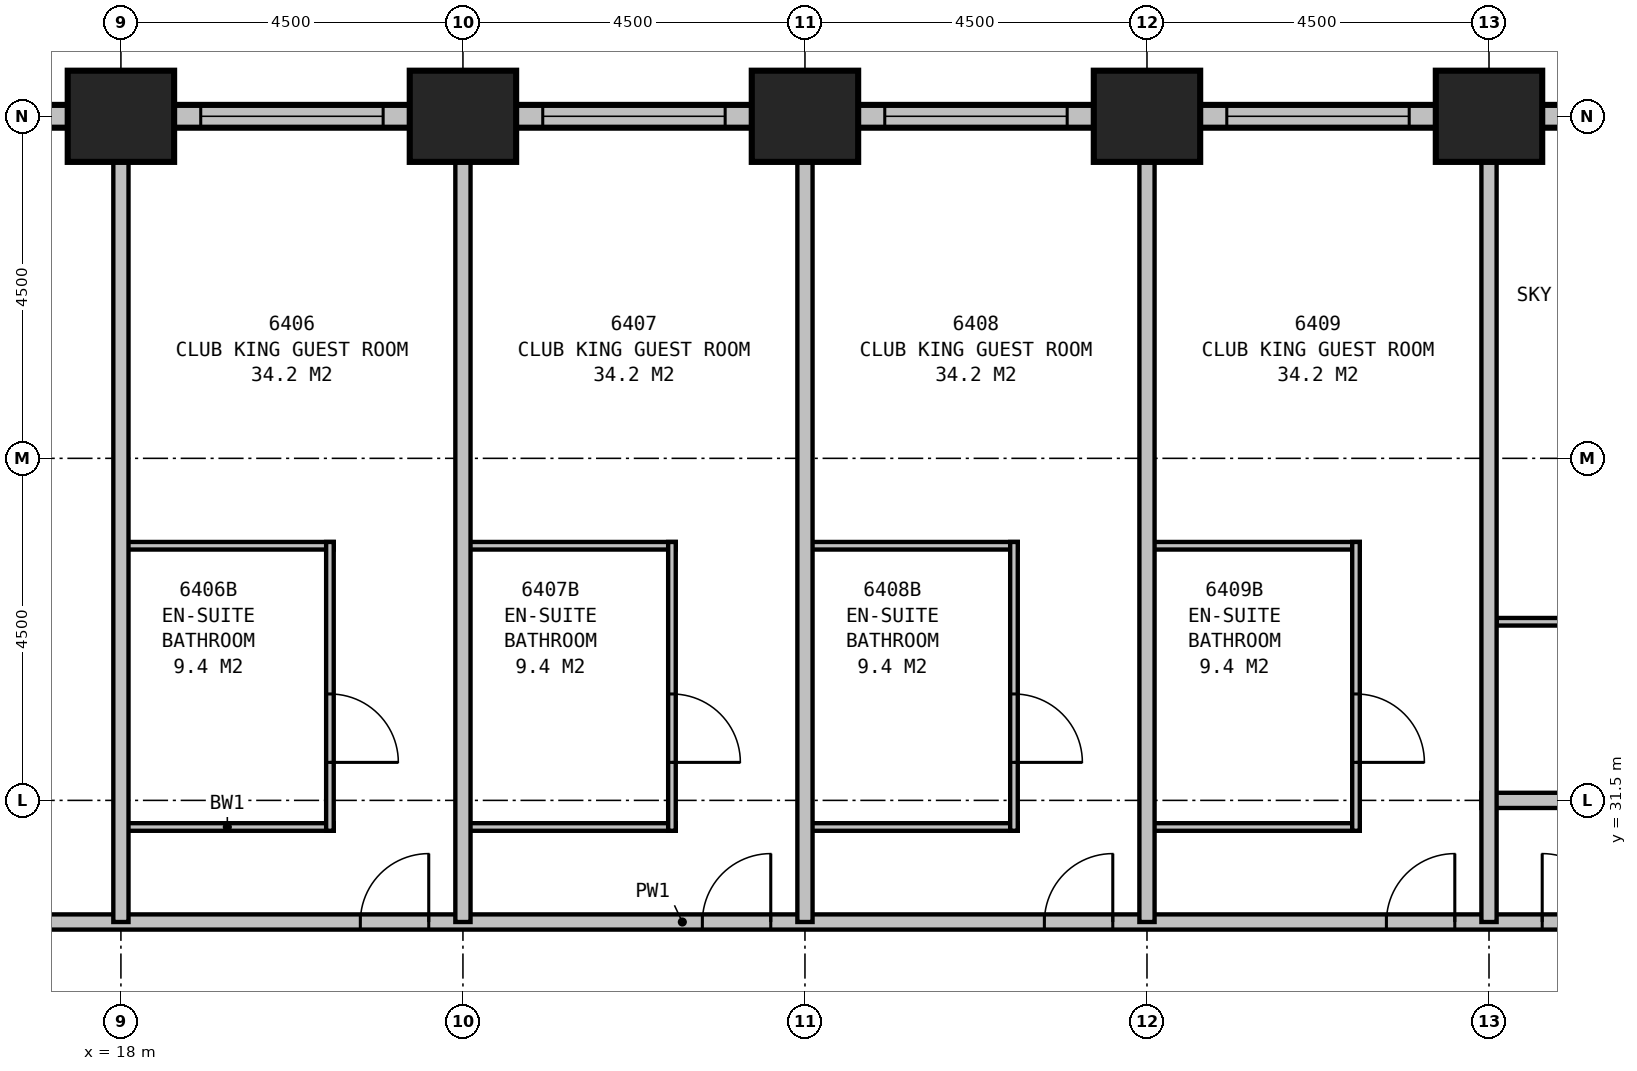
"""IFC4 building model, lengths in metres.
Left out: names, types, materials, properties, quantities, classifications, styles, units other than length and angle.
Written with IfcOpenShell. Run it as: python <this file> out.ifc"""

import sys

from ifc_helpers import new_model, si_unit, direction, frame, frame_2d, origin, origin_2d, place, context, subcontext, project, spatial, rectangle, extrude, element, fill, save


model = new_model("IFC4")
c1 = context("Model", 3, precision=1e-05, world=origin(), true_north=direction((0.0, 1.0)))
c2 = subcontext(c1, "Body", "Model", "MODEL_VIEW")
j1 = project(units=[si_unit("LENGTHUNIT", "METRE"), si_unit("PLANEANGLEUNIT", "RADIAN")], contexts=[c1])
p1 = place(None, origin())
s1 = spatial("IfcSite", under=j1, at=p1, CompositionType="ELEMENT")
p2 = place(p1, origin())
s2 = spatial("IfcBuilding", under=s1, at=p2, CompositionType="ELEMENT")
p3 = place(p2, frame((0.0, 0.0, 250.7)))
s3 = spatial("IfcBuildingStorey", under=s2, at=p3, CompositionType="ELEMENT", Elevation=250.7)
for number, where, z_axis, x_axis in (
    (1, (36.0, 40.5, 0.0), (0.0, 0.0, 1.0), (1.0, 0.0, 0.0)),
    (2, (31.5, 40.5, 0.0), (0.0, 0.0, 1.0), (1.0, 0.0, 0.0)),
    (3, (27.0, 40.5, 0.0), (0.0, 0.0, 1.0), (1.0, 0.0, 0.0)),
    (4, (22.5, 40.5, 0.0), (0.0, 0.0, 1.0), (1.0, 0.0, 0.0)),
    (5, (18.0, 40.5, 0.0), (0.0, 0.0, 1.0), (1.0, 0.0, 0.0)),
):
    element("IfcColumn", number, at=place(p3, frame(where, z_axis=z_axis, x_axis=x_axis)), inside=s3, PredefinedType="COLUMN", context=c2, shape_type="SweptSolid", body=[
        extrude(rectangle(XDim=1.4, YDim=1.2, at=origin_2d()), origin(), (0.0, 0.0, 1.0), 3.9),
    ])
p4 = place(p3, frame((40.65, 40.5, 0.0), z_axis=(0.0, 0.0, 1.0), x_axis=(-1.0, 0.0, 0.0)))
e6 = element("IfcWall", 6, at=p4, inside=s3, PredefinedType="STANDARD", context=c2, shape_type="SweptSolid", body=[
    extrude(rectangle(XDim=27.3, YDim=0.3, at=frame_2d((13.65, 0.0))), origin(), (0.0, 0.0, 1.0), 2.65),
])
p5 = place(p4, frame((1.2, 0.0, 0.5)))
e7 = element("IfcOpeningElement", 7, at=p5, cuts=e6, PredefinedType="OPENING", context=c2, shape_type="SweptSolid", body=[
    extrude(rectangle(XDim=2.4, YDim=2.0, at=frame_2d((1.2, 1.0))), frame((0.0, 0.16, 0.0), z_axis=(0.0, -1.0, 0.0), x_axis=(1.0, 0.0, 0.0)), (0.0, 0.0, 1.0), 0.32),
])
p6 = place(p4, frame((5.7, 0.0, 0.5)))
e8 = element("IfcOpeningElement", 8, at=p6, cuts=e6, PredefinedType="OPENING", context=c2, shape_type="SweptSolid", body=[
    extrude(rectangle(XDim=2.4, YDim=2.0, at=frame_2d((1.2, 1.0))), frame((0.0, 0.16, 0.0), z_axis=(0.0, -1.0, 0.0), x_axis=(1.0, 0.0, 0.0)), (0.0, 0.0, 1.0), 0.32),
])
p7 = place(p4, frame((10.2, 0.0, 0.5)))
e9 = element("IfcOpeningElement", 9, at=p7, cuts=e6, PredefinedType="OPENING", context=c2, shape_type="SweptSolid", body=[
    extrude(rectangle(XDim=2.4, YDim=2.0, at=frame_2d((1.2, 1.0))), frame((0.0, 0.16, 0.0), z_axis=(0.0, -1.0, 0.0), x_axis=(1.0, 0.0, 0.0)), (0.0, 0.0, 1.0), 0.32),
])
p8 = place(p4, frame((14.7, 0.0, 0.5)))
e10 = element("IfcOpeningElement", 10, at=p8, cuts=e6, PredefinedType="OPENING", context=c2, shape_type="SweptSolid", body=[
    extrude(rectangle(XDim=2.4, YDim=2.0, at=frame_2d((1.2, 1.0))), frame((0.0, 0.16, 0.0), z_axis=(0.0, -1.0, 0.0), x_axis=(1.0, 0.0, 0.0)), (0.0, 0.0, 1.0), 0.32),
])
p9 = place(p4, frame((19.2, 0.0, 0.5)))
e11 = element("IfcOpeningElement", 11, at=p9, cuts=e6, PredefinedType="OPENING", context=c2, shape_type="SweptSolid", body=[
    extrude(rectangle(XDim=2.4, YDim=2.0, at=frame_2d((1.2, 1.0))), frame((0.0, 0.16, 0.0), z_axis=(0.0, -1.0, 0.0), x_axis=(1.0, 0.0, 0.0)), (0.0, 0.0, 1.0), 0.32),
])
p10 = place(p4, frame((23.7, 0.0, 0.5)))
e12 = element("IfcOpeningElement", 12, at=p10, cuts=e6, PredefinedType="OPENING", context=c2, shape_type="SweptSolid", body=[
    extrude(rectangle(XDim=2.4, YDim=2.0, at=frame_2d((1.2, 1.0))), frame((0.0, 0.16, 0.0), z_axis=(0.0, -1.0, 0.0), x_axis=(1.0, 0.0, 0.0)), (0.0, 0.0, 1.0), 0.32),
])
p11 = place(p3, frame((12.473, 29.9, 0.0), z_axis=(0.0, 0.0, 1.0), x_axis=(1.0, 0.0, 0.0)))
e13 = element("IfcWall", 13, at=p11, inside=s3, PredefinedType="PARTITIONING", context=c2, shape_type="SweptSolid", body=[
    extrude(rectangle(XDim=25.827, YDim=0.2, at=frame_2d((12.914, 0.0))), origin(), (0.0, 0.0, 1.0), 3.65),
])
p12 = place(p11, frame((0.85, 0.0, 0.0)))
e14 = element("IfcOpeningElement", 14, at=p12, cuts=e13, PredefinedType="OPENING", context=c2, shape_type="SweptSolid", body=[
    extrude(rectangle(XDim=0.9, YDim=2.1, at=frame_2d((0.45, 1.05))), frame((0.0, 0.11, 0.0), z_axis=(0.0, -1.0, 0.0), x_axis=(1.0, 0.0, 0.0)), (0.0, 0.0, 1.0), 0.22),
])
p13 = place(p11, frame((8.677, 0.0, 0.0)))
e15 = element("IfcOpeningElement", 15, at=p13, cuts=e13, PredefinedType="OPENING", context=c2, shape_type="SweptSolid", body=[
    extrude(rectangle(XDim=0.9, YDim=2.1, at=frame_2d((0.45, 1.05))), frame((0.0, 0.11, 0.0), z_axis=(0.0, -1.0, 0.0), x_axis=(1.0, 0.0, 0.0)), (0.0, 0.0, 1.0), 0.22),
])
p14 = place(p11, frame((13.177, 0.0, 0.0)))
e16 = element("IfcOpeningElement", 16, at=p14, cuts=e13, PredefinedType="OPENING", context=c2, shape_type="SweptSolid", body=[
    extrude(rectangle(XDim=0.9, YDim=2.1, at=frame_2d((0.45, 1.05))), frame((0.0, 0.11, 0.0), z_axis=(0.0, -1.0, 0.0), x_axis=(1.0, 0.0, 0.0)), (0.0, 0.0, 1.0), 0.22),
])
p15 = place(p11, frame((17.677, 0.0, 0.0)))
e17 = element("IfcOpeningElement", 17, at=p15, cuts=e13, PredefinedType="OPENING", context=c2, shape_type="SweptSolid", body=[
    extrude(rectangle(XDim=0.9, YDim=2.1, at=frame_2d((0.45, 1.05))), frame((0.0, 0.11, 0.0), z_axis=(0.0, -1.0, 0.0), x_axis=(1.0, 0.0, 0.0)), (0.0, 0.0, 1.0), 0.22),
])
p16 = place(p11, frame((22.177, 0.0, 0.0)))
e18 = element("IfcOpeningElement", 18, at=p16, cuts=e13, PredefinedType="OPENING", context=c2, shape_type="SweptSolid", body=[
    extrude(rectangle(XDim=0.9, YDim=2.1, at=frame_2d((0.45, 1.05))), frame((0.0, 0.11, 0.0), z_axis=(0.0, -1.0, 0.0), x_axis=(1.0, 0.0, 0.0)), (0.0, 0.0, 1.0), 0.22),
])
p17 = place(p11, frame((24.227, 0.0, 0.0)))
e19 = element("IfcOpeningElement", 19, at=p17, cuts=e13, PredefinedType="OPENING", context=c2, shape_type="SweptSolid", body=[
    extrude(rectangle(XDim=0.9, YDim=2.1, at=frame_2d((0.45, 1.05))), frame((0.0, 0.11, 0.0), z_axis=(0.0, -1.0, 0.0), x_axis=(1.0, 0.0, 0.0)), (0.0, 0.0, 1.0), 0.22),
])
for number, where, z_axis, x_axis in (
    (20, (18.0, 29.9, 0.0), (0.0, 0.0, 1.0), (0.0, 1.0, 0.0)),
    (21, (22.5, 29.9, 0.0), (0.0, 0.0, 1.0), (0.0, 1.0, 0.0)),
    (22, (27.0, 29.9, 0.0), (0.0, 0.0, 1.0), (0.0, 1.0, 0.0)),
    (23, (31.5, 29.9, 0.0), (0.0, 0.0, 1.0), (0.0, 1.0, 0.0)),
):
    element("IfcWall", number, at=place(p3, frame(where, z_axis=z_axis, x_axis=x_axis)), inside=s3, PredefinedType="PARTITIONING", context=c2, shape_type="SweptSolid", body=[
        extrude(rectangle(XDim=10.6, YDim=0.2, at=frame_2d((5.3, 0.0))), origin(), (0.0, 0.0, 1.0), 2.65),
    ])
for number, where, z_axis, x_axis in (
    (24, (18.0, 31.15, 0.0), (0.0, 0.0, 1.0), (1.0, 0.0, 0.0)),
    (25, (18.0, 34.85, 0.0), (0.0, 0.0, 1.0), (1.0, 0.0, 0.0)),
):
    element("IfcWall", number, at=place(p3, frame(where, z_axis=z_axis, x_axis=x_axis)), inside=s3, PredefinedType="PLUMBINGWALL", context=c2, shape_type="SweptSolid", body=[
        extrude(rectangle(XDim=2.8, YDim=0.1, at=frame_2d((1.4, 0.0))), origin(), (0.0, 0.0, 1.0), 3.65),
    ])
p18 = place(p3, frame((20.75, 31.1, 0.0), z_axis=(0.0, 0.0, 1.0), x_axis=(0.0, 1.0, 0.0)))
e26 = element("IfcWall", 26, at=p18, inside=s3, PredefinedType="PLUMBINGWALL", context=c2, shape_type="SweptSolid", body=[
    extrude(rectangle(XDim=3.8, YDim=0.1, at=frame_2d((1.9, 0.0))), origin(), (0.0, 0.0, 1.0), 3.65),
])
p19 = place(p18, frame((1.8, 0.0, 0.0), z_axis=(0.0, 0.0, 1.0), x_axis=(-1.0, 0.0, 0.0)))
e27 = element("IfcOpeningElement", 27, at=p19, cuts=e26, PredefinedType="OPENING", context=c2, shape_type="SweptSolid", body=[
    extrude(rectangle(XDim=0.9, YDim=2.1, at=frame_2d((0.45, 1.05))), frame((0.0, 0.06, 0.0), z_axis=(0.0, -1.0, 0.0), x_axis=(1.0, 0.0, 0.0)), (0.0, 0.0, 1.0), 0.12),
])
for number, where, z_axis, x_axis in (
    (28, (22.5, 31.15, 0.0), (0.0, 0.0, 1.0), (1.0, 0.0, 0.0)),
    (29, (22.5, 34.85, 0.0), (0.0, 0.0, 1.0), (1.0, 0.0, 0.0)),
):
    element("IfcWall", number, at=place(p3, frame(where, z_axis=z_axis, x_axis=x_axis)), inside=s3, PredefinedType="PLUMBINGWALL", context=c2, shape_type="SweptSolid", body=[
        extrude(rectangle(XDim=2.8, YDim=0.1, at=frame_2d((1.4, 0.0))), origin(), (0.0, 0.0, 1.0), 3.65),
    ])
p20 = place(p3, frame((25.25, 31.1, 0.0), z_axis=(0.0, 0.0, 1.0), x_axis=(0.0, 1.0, 0.0)))
e30 = element("IfcWall", 30, at=p20, inside=s3, PredefinedType="PLUMBINGWALL", context=c2, shape_type="SweptSolid", body=[
    extrude(rectangle(XDim=3.8, YDim=0.1, at=frame_2d((1.9, 0.0))), origin(), (0.0, 0.0, 1.0), 3.65),
])
p21 = place(p20, frame((1.8, 0.0, 0.0), z_axis=(0.0, 0.0, 1.0), x_axis=(-1.0, 0.0, 0.0)))
e31 = element("IfcOpeningElement", 31, at=p21, cuts=e30, PredefinedType="OPENING", context=c2, shape_type="SweptSolid", body=[
    extrude(rectangle(XDim=0.9, YDim=2.1, at=frame_2d((0.45, 1.05))), frame((0.0, 0.06, 0.0), z_axis=(0.0, -1.0, 0.0), x_axis=(1.0, 0.0, 0.0)), (0.0, 0.0, 1.0), 0.12),
])
for number, where, z_axis, x_axis in (
    (32, (27.0, 31.15, 0.0), (0.0, 0.0, 1.0), (1.0, 0.0, 0.0)),
    (33, (27.0, 34.85, 0.0), (0.0, 0.0, 1.0), (1.0, 0.0, 0.0)),
):
    element("IfcWall", number, at=place(p3, frame(where, z_axis=z_axis, x_axis=x_axis)), inside=s3, PredefinedType="PLUMBINGWALL", context=c2, shape_type="SweptSolid", body=[
        extrude(rectangle(XDim=2.8, YDim=0.1, at=frame_2d((1.4, 0.0))), origin(), (0.0, 0.0, 1.0), 3.65),
    ])
p22 = place(p3, frame((29.75, 31.1, 0.0), z_axis=(0.0, 0.0, 1.0), x_axis=(0.0, 1.0, 0.0)))
e34 = element("IfcWall", 34, at=p22, inside=s3, PredefinedType="PLUMBINGWALL", context=c2, shape_type="SweptSolid", body=[
    extrude(rectangle(XDim=3.8, YDim=0.1, at=frame_2d((1.9, 0.0))), origin(), (0.0, 0.0, 1.0), 3.65),
])
p23 = place(p22, frame((1.8, 0.0, 0.0), z_axis=(0.0, 0.0, 1.0), x_axis=(-1.0, 0.0, 0.0)))
e35 = element("IfcOpeningElement", 35, at=p23, cuts=e34, PredefinedType="OPENING", context=c2, shape_type="SweptSolid", body=[
    extrude(rectangle(XDim=0.9, YDim=2.1, at=frame_2d((0.45, 1.05))), frame((0.0, 0.06, 0.0), z_axis=(0.0, -1.0, 0.0), x_axis=(1.0, 0.0, 0.0)), (0.0, 0.0, 1.0), 0.12),
])
for number, where, z_axis, x_axis in (
    (36, (31.5, 31.15, 0.0), (0.0, 0.0, 1.0), (1.0, 0.0, 0.0)),
    (37, (31.5, 34.85, 0.0), (0.0, 0.0, 1.0), (1.0, 0.0, 0.0)),
):
    element("IfcWall", number, at=place(p3, frame(where, z_axis=z_axis, x_axis=x_axis)), inside=s3, PredefinedType="PLUMBINGWALL", context=c2, shape_type="SweptSolid", body=[
        extrude(rectangle(XDim=2.8, YDim=0.1, at=frame_2d((1.4, 0.0))), origin(), (0.0, 0.0, 1.0), 3.65),
    ])
p24 = place(p3, frame((34.25, 31.1, 0.0), z_axis=(0.0, 0.0, 1.0), x_axis=(0.0, 1.0, 0.0)))
e38 = element("IfcWall", 38, at=p24, inside=s3, PredefinedType="PLUMBINGWALL", context=c2, shape_type="SweptSolid", body=[
    extrude(rectangle(XDim=3.8, YDim=0.1, at=frame_2d((1.9, 0.0))), origin(), (0.0, 0.0, 1.0), 3.65),
])
p25 = place(p24, frame((1.8, 0.0, 0.0), z_axis=(0.0, 0.0, 1.0), x_axis=(-1.0, 0.0, 0.0)))
e39 = element("IfcOpeningElement", 39, at=p25, cuts=e38, PredefinedType="OPENING", context=c2, shape_type="SweptSolid", body=[
    extrude(rectangle(XDim=0.9, YDim=2.1, at=frame_2d((0.45, 1.05))), frame((0.0, 0.06, 0.0), z_axis=(0.0, -1.0, 0.0), x_axis=(1.0, 0.0, 0.0)), (0.0, 0.0, 1.0), 0.12),
])
p26 = place(p3, frame((36.0, 29.9, 0.0), z_axis=(0.0, 0.0, 1.0), x_axis=(0.0, 1.0, 0.0)))
e40 = element("IfcWall", 40, at=p26, inside=s3, PredefinedType="PARTITIONING", context=c2, shape_type="SweptSolid", body=[
    extrude(rectangle(XDim=10.6, YDim=0.2, at=frame_2d((5.3, 0.0))), origin(), (0.0, 0.0, 1.0), 2.65),
])
p27 = place(p3, frame((35.9, 31.5, 0.0), z_axis=(0.0, 0.0, 1.0), x_axis=(1.0, 0.0, 0.0)))
e41 = element("IfcWall", 41, at=p27, inside=s3, PredefinedType="PARTITIONING", context=c2, shape_type="SweptSolid", body=[
    extrude(rectangle(XDim=10.099, YDim=0.2, at=frame_2d((5.05, 0.0))), origin(), (0.0, 0.0, 1.0), 3.65),
])
p28 = place(p27, frame((8.099, 0.0, 0.0)))
e42 = element("IfcOpeningElement", 42, at=p28, cuts=e41, PredefinedType="OPENING", context=c2, shape_type="SweptSolid", body=[
    extrude(rectangle(XDim=0.9, YDim=2.1, at=frame_2d((0.45, 1.05))), frame((0.0, 0.11, 0.0), z_axis=(0.0, -1.0, 0.0), x_axis=(1.0, 0.0, 0.0)), (0.0, 0.0, 1.0), 0.22),
])
p29 = place(p3, frame((36.1, 33.85, 0.0), z_axis=(0.0, 0.0, 1.0), x_axis=(1.0, 0.0, 0.0)))
e43 = element("IfcWall", 43, at=p29, inside=s3, PredefinedType="PLUMBINGWALL", context=c2, shape_type="SweptSolid", body=[
    extrude(rectangle(XDim=3.9, YDim=0.1, at=frame_2d((1.95, 0.0))), origin(), (0.0, 0.0, 1.0), 3.65),
])
p30 = place(p29, frame((0.9, 0.0, 0.0)))
e44 = element("IfcOpeningElement", 44, at=p30, cuts=e43, PredefinedType="OPENING", context=c2, shape_type="SweptSolid", body=[
    extrude(rectangle(XDim=0.9, YDim=2.1, at=frame_2d((0.45, 1.05))), frame((0.0, 0.06, 0.0), z_axis=(0.0, -1.0, 0.0), x_axis=(1.0, 0.0, 0.0)), (0.0, 0.0, 1.0), 0.12),
])
p31 = place(p6, origin())
e45 = element("IfcWindow", 45, at=p31, inside=s3, PartitioningType="SINGLE_PANEL", PredefinedType="WINDOW", context=c2, shape_type="SweptSolid", body=[
    extrude(rectangle(XDim=2.4, YDim=2.0, at=frame_2d((1.2, 1.0))), frame((0.0, 0.03, 0.0), z_axis=(0.0, -1.0, 0.0), x_axis=(1.0, 0.0, 0.0)), (0.0, 0.0, 1.0), 0.06),
])
fill(e8, e45)
p32 = place(p7, origin())
e46 = element("IfcWindow", 46, at=p32, inside=s3, PartitioningType="SINGLE_PANEL", PredefinedType="WINDOW", context=c2, shape_type="SweptSolid", body=[
    extrude(rectangle(XDim=2.4, YDim=2.0, at=frame_2d((1.2, 1.0))), frame((0.0, 0.03, 0.0), z_axis=(0.0, -1.0, 0.0), x_axis=(1.0, 0.0, 0.0)), (0.0, 0.0, 1.0), 0.06),
])
fill(e9, e46)
p33 = place(p8, origin())
e47 = element("IfcWindow", 47, at=p33, inside=s3, PartitioningType="SINGLE_PANEL", PredefinedType="WINDOW", context=c2, shape_type="SweptSolid", body=[
    extrude(rectangle(XDim=2.4, YDim=2.0, at=frame_2d((1.2, 1.0))), frame((0.0, 0.03, 0.0), z_axis=(0.0, -1.0, 0.0), x_axis=(1.0, 0.0, 0.0)), (0.0, 0.0, 1.0), 0.06),
])
fill(e10, e47)
p34 = place(p9, origin())
e48 = element("IfcWindow", 48, at=p34, inside=s3, PartitioningType="SINGLE_PANEL", PredefinedType="WINDOW", context=c2, shape_type="SweptSolid", body=[
    extrude(rectangle(XDim=2.4, YDim=2.0, at=frame_2d((1.2, 1.0))), frame((0.0, 0.03, 0.0), z_axis=(0.0, -1.0, 0.0), x_axis=(1.0, 0.0, 0.0)), (0.0, 0.0, 1.0), 0.06),
])
fill(e11, e48)
p35 = place(p13, origin())
e49 = element("IfcDoor", 49, at=p35, inside=s3, OperationType="SINGLE_SWING_RIGHT", PredefinedType="DOOR", context=c2, shape_type="SweptSolid", body=[
    extrude(rectangle(XDim=0.9, YDim=2.1, at=frame_2d((0.45, 1.05))), frame((0.0, 0.025, 0.0), z_axis=(0.0, -1.0, 0.0), x_axis=(1.0, 0.0, 0.0)), (0.0, 0.0, 1.0), 0.05),
])
fill(e15, e49)
p36 = place(p14, origin())
e50 = element("IfcDoor", 50, at=p36, inside=s3, OperationType="SINGLE_SWING_RIGHT", PredefinedType="DOOR", context=c2, shape_type="SweptSolid", body=[
    extrude(rectangle(XDim=0.9, YDim=2.1, at=frame_2d((0.45, 1.05))), frame((0.0, 0.025, 0.0), z_axis=(0.0, -1.0, 0.0), x_axis=(1.0, 0.0, 0.0)), (0.0, 0.0, 1.0), 0.05),
])
fill(e16, e50)
p37 = place(p15, origin())
e51 = element("IfcDoor", 51, at=p37, inside=s3, OperationType="SINGLE_SWING_RIGHT", PredefinedType="DOOR", context=c2, shape_type="SweptSolid", body=[
    extrude(rectangle(XDim=0.9, YDim=2.1, at=frame_2d((0.45, 1.05))), frame((0.0, 0.025, 0.0), z_axis=(0.0, -1.0, 0.0), x_axis=(1.0, 0.0, 0.0)), (0.0, 0.0, 1.0), 0.05),
])
fill(e17, e51)
p38 = place(p16, origin())
e52 = element("IfcDoor", 52, at=p38, inside=s3, OperationType="SINGLE_SWING_RIGHT", PredefinedType="DOOR", context=c2, shape_type="SweptSolid", body=[
    extrude(rectangle(XDim=0.9, YDim=2.1, at=frame_2d((0.45, 1.05))), frame((0.0, 0.025, 0.0), z_axis=(0.0, -1.0, 0.0), x_axis=(1.0, 0.0, 0.0)), (0.0, 0.0, 1.0), 0.05),
])
fill(e18, e52)
p39 = place(p17, origin())
e53 = element("IfcDoor", 53, at=p39, inside=s3, OperationType="SINGLE_SWING_LEFT", PredefinedType="DOOR", context=c2, shape_type="SweptSolid", body=[
    extrude(rectangle(XDim=0.9, YDim=2.1, at=frame_2d((0.45, 1.05))), frame((0.0, 0.025, 0.0), z_axis=(0.0, -1.0, 0.0), x_axis=(1.0, 0.0, 0.0)), (0.0, 0.0, 1.0), 0.05),
])
fill(e19, e53)
p40 = place(p19, origin())
e54 = element("IfcDoor", 54, at=p40, inside=s3, OperationType="SINGLE_SWING_RIGHT", PredefinedType="DOOR", context=c2, shape_type="SweptSolid", body=[
    extrude(rectangle(XDim=0.9, YDim=2.1, at=frame_2d((0.45, 1.05))), frame((0.0, 0.025, 0.0), z_axis=(0.0, -1.0, 0.0), x_axis=(1.0, 0.0, 0.0)), (0.0, 0.0, 1.0), 0.05),
])
fill(e27, e54)
p41 = place(p21, origin())
e55 = element("IfcDoor", 55, at=p41, inside=s3, OperationType="SINGLE_SWING_RIGHT", PredefinedType="DOOR", context=c2, shape_type="SweptSolid", body=[
    extrude(rectangle(XDim=0.9, YDim=2.1, at=frame_2d((0.45, 1.05))), frame((0.0, 0.025, 0.0), z_axis=(0.0, -1.0, 0.0), x_axis=(1.0, 0.0, 0.0)), (0.0, 0.0, 1.0), 0.05),
])
fill(e31, e55)
p42 = place(p23, origin())
e56 = element("IfcDoor", 56, at=p42, inside=s3, OperationType="SINGLE_SWING_RIGHT", PredefinedType="DOOR", context=c2, shape_type="SweptSolid", body=[
    extrude(rectangle(XDim=0.9, YDim=2.1, at=frame_2d((0.45, 1.05))), frame((0.0, 0.025, 0.0), z_axis=(0.0, -1.0, 0.0), x_axis=(1.0, 0.0, 0.0)), (0.0, 0.0, 1.0), 0.05),
])
fill(e35, e56)
p43 = place(p25, origin())
e57 = element("IfcDoor", 57, at=p43, inside=s3, OperationType="SINGLE_SWING_RIGHT", PredefinedType="DOOR", context=c2, shape_type="SweptSolid", body=[
    extrude(rectangle(XDim=0.9, YDim=2.1, at=frame_2d((0.45, 1.05))), frame((0.0, 0.025, 0.0), z_axis=(0.0, -1.0, 0.0), x_axis=(1.0, 0.0, 0.0)), (0.0, 0.0, 1.0), 0.05),
])
fill(e39, e57)
save(model, sys.argv[1])
